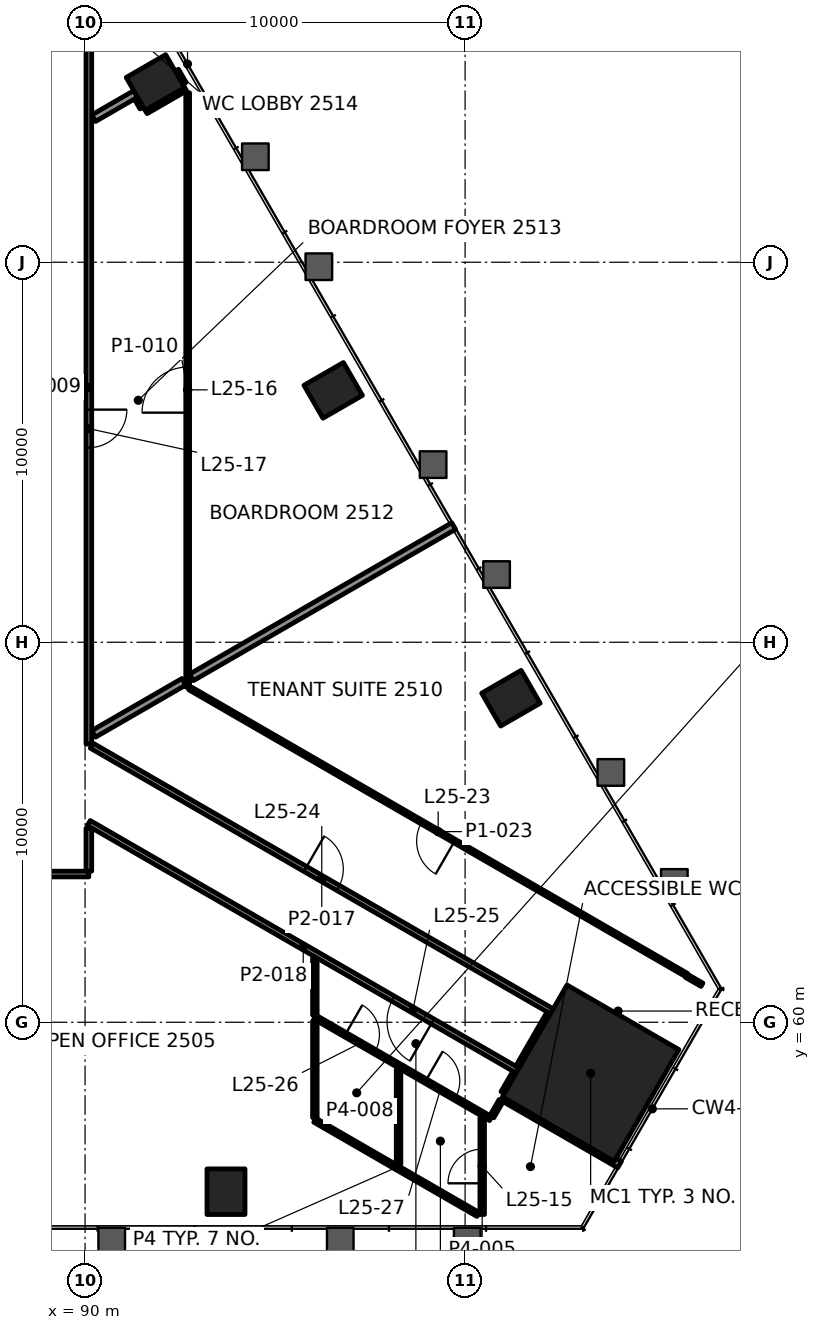
"""IFC4 building model, lengths in metres.
Left out: names, types, materials, properties, quantities, classifications, styles, units other than length and angle.
Written with IfcOpenShell. Run it as: python <this file> out.ifc"""

import sys

from ifc_helpers import new_model, si_unit, direction, frame, frame_2d, origin, origin_2d, place, context, subcontext, project, spatial, rectangle, extrude, element, fill, save


model = new_model("IFC4")
c1 = context("Model", 3, precision=1e-05, world=origin(), true_north=direction((0.0, 1.0)))
c2 = subcontext(c1, "Body", "Model", "MODEL_VIEW")
j1 = project(units=[si_unit("LENGTHUNIT", "METRE"), si_unit("PLANEANGLEUNIT", "RADIAN")], contexts=[c1])
p1 = place(None, origin())
s1 = spatial("IfcSite", under=j1, at=p1, CompositionType="ELEMENT")
p2 = place(p1, origin())
s2 = spatial("IfcBuilding", under=s1, at=p2, CompositionType="ELEMENT")
p3 = place(p2, frame((0.0, 0.0, 111.4)))
s3 = spatial("IfcBuildingStorey", under=s2, at=p3, CompositionType="ELEMENT", Elevation=111.4)
p4 = place(p3, frame((103.304, 58.659, 0.0), z_axis=(0.0, 0.0, 1.0), x_axis=(0.5, 0.866025403784, 0.0)))
e1 = element("IfcColumn", 1, at=p4, inside=s3, PredefinedType="COLUMN", context=c2, shape_type="SweptSolid", body=[
    extrude(rectangle(XDim=3.4, YDim=3.4, at=origin_2d()), origin(), (0.0, 0.0, 1.0), 4.2),
])
for number, where, z_axis, x_axis in (
    (2, (93.708, 55.541, -0.0), (0.0, 0.0, 1.0), (1.0, 0.0, 0.0)),
    (3, (101.206, 68.528, -0.0), (0.0, 0.0, 1.0), (-0.5, 0.866, 0.0)),
    (4, (96.529, 76.628, -0.0), (0.0, 0.0, 1.0), (-0.5, 0.866, 0.0)),
    (5, (91.852, 84.729, -0.0), (0.0, 0.0, 1.0), (-0.5, 0.866, 0.0)),
):
    element("IfcColumn", number, at=place(p3, frame(where, z_axis=z_axis, x_axis=x_axis)), inside=s3, PredefinedType="COLUMN", context=c2, shape_type="SweptSolid", body=[
        extrude(rectangle(XDim=1.0, YDim=1.2, at=origin_2d()), origin(), (0.0, 0.0, 1.0), 4.2),
    ])
p5 = place(p3, frame((90.099, 63.9, 0.0), z_axis=(0.0, 0.0, 1.0), x_axis=(-1.0, 0.0, 0.0)))
e6 = element("IfcWall", 6, at=p5, inside=s3, PredefinedType="PARTITIONING", context=c2, shape_type="SweptSolid", body=[
    extrude(rectangle(XDim=30.199, YDim=0.15, at=frame_2d((15.099, 0.0))), origin(), (0.0, 0.0, 1.0), 3.4),
])
p6 = place(p5, frame((5.882, 0.0, 0.0)))
e7 = element("IfcOpeningElement", 7, at=p6, cuts=e6, PredefinedType="OPENING", context=c2, shape_type="SweptSolid", body=[
    extrude(rectangle(XDim=1.2, YDim=2.1, at=frame_2d((0.6, 1.05))), frame((0.0, 0.085, 0.0), z_axis=(0.0, -1.0, 0.0), x_axis=(1.0, 0.0, 0.0)), (0.0, 0.0, 1.0), 0.17),
])
p7 = place(p5, frame((20.346, 0.0, 0.0)))
e8 = element("IfcOpeningElement", 8, at=p7, cuts=e6, PredefinedType="OPENING", context=c2, shape_type="SweptSolid", body=[
    extrude(rectangle(XDim=1.2, YDim=2.1, at=frame_2d((0.6, 1.05))), frame((0.0, 0.085, 0.0), z_axis=(0.0, -1.0, 0.0), x_axis=(1.0, 0.0, 0.0)), (0.0, 0.0, 1.0), 0.17),
])
p8 = place(p3, frame((90.227, 67.59, 0.0), z_axis=(0.0, 0.0, 1.0), x_axis=(0.866003105128, 0.500038620418, 0.0)))
e9 = element("IfcWall", 9, at=p8, inside=s3, PredefinedType="PARTITIONING", context=c2, shape_type="SweptSolid", body=[
    extrude(rectangle(XDim=2.74, YDim=0.2, at=frame_2d((1.37, 0.0))), origin(), (0.0, 0.0, 1.0), 3.4),
])
p9 = place(p3, frame((91.583, 83.997, 0.0), z_axis=(0.0, 0.0, 1.0), x_axis=(0.866066905393, 0.499928110214, 0.0)))
e10 = element("IfcWall", 10, at=p9, inside=s3, PredefinedType="PARTITIONING", context=c2, shape_type="SweptSolid", body=[
    extrude(rectangle(XDim=1.199, YDim=0.2, at=frame_2d((0.6, 0.0))), origin(), (0.0, 0.0, 1.0), 3.165),
])
p10 = place(p3, frame((90.227, 83.792, 0.0), z_axis=(0.0, 0.0, 1.0), x_axis=(0.866067665301, 0.499926793761, 0.0)))
e11 = element("IfcWall", 11, at=p10, inside=s3, PredefinedType="PARTITIONING", context=c2, shape_type="SweptSolid", body=[
    extrude(rectangle(XDim=1.276, YDim=0.2, at=frame_2d((0.638, 0.0))), origin(), (0.0, 0.0, 1.0), 3.4),
])
p11 = place(p3, frame((100.704, 57.516, 0.0), z_axis=(0.0, 0.0, 1.0), x_axis=(0.499679281737, 0.866210491395, 0.0)))
e12 = element("IfcWall", 12, at=p11, inside=s3, PredefinedType="PARTITIONING", context=c2, shape_type="SweptSolid", body=[
    extrude(rectangle(XDim=0.49, YDim=0.12, at=frame_2d((0.245, 0.0))), origin(), (0.0, 0.0, 1.0), 3.4),
])
p12 = place(p3, frame((101.031, 58.124, 0.0), z_axis=(0.0, 0.0, 1.0), x_axis=(0.500049599607, 0.865996765544, 0.0)))
e13 = element("IfcWall", 13, at=p12, inside=s3, PredefinedType="PARTITIONING", context=c2, shape_type="SweptSolid", body=[
    extrude(rectangle(XDim=0.625, YDim=0.2, at=frame_2d((0.312, 0.0))), origin(), (0.0, 0.0, 1.0), 3.4),
])
p13 = place(p3, frame((100.45, 54.941, 0.0), z_axis=(0.0, 0.0, 1.0), x_axis=(0.0, 1.0, 0.0)))
e14 = element("IfcWall", 14, at=p13, inside=s3, PredefinedType="PARTITIONING", context=c2, shape_type="SweptSolid", body=[
    extrude(rectangle(XDim=2.542, YDim=0.12, at=frame_2d((1.271, 0.0))), origin(), (0.0, 0.0, 1.0), 3.4),
])
p14 = place(p13, frame((0.821, 0.0, 0.0)))
e15 = element("IfcOpeningElement", 15, at=p14, cuts=e14, PredefinedType="OPENING", context=c2, shape_type="SweptSolid", body=[
    extrude(rectangle(XDim=0.9, YDim=2.1, at=frame_2d((0.45, 1.05))), frame((0.0, 0.07, 0.0), z_axis=(0.0, -1.0, 0.0), x_axis=(1.0, 0.0, 0.0)), (0.0, 0.0, 1.0), 0.14),
])
p15 = place(p3, frame((98.249, 56.26, 0.0), z_axis=(0.0, 0.0, 1.0), x_axis=(0.0, 1.0, 0.0)))
e16 = element("IfcWall", 16, at=p15, inside=s3, PredefinedType="PARTITIONING", context=c2, shape_type="SweptSolid", body=[
    extrude(rectangle(XDim=2.495, YDim=0.12, at=frame_2d((1.248, 0.0))), origin(), (0.0, 0.0, 1.0), 3.4),
])
p16 = place(p3, frame((96.047, 57.491, 0.0), z_axis=(0.0, 0.0, 1.0), x_axis=(0.0, 1.0, 0.0)))
e17 = element("IfcWall", 17, at=p16, inside=s3, PredefinedType="PARTITIONING", context=c2, shape_type="SweptSolid", body=[
    extrude(rectangle(XDim=2.541, YDim=0.12, at=frame_2d((1.27, 0.0))), origin(), (0.0, 0.0, 1.0), 3.4),
])
p17 = place(p3, frame((92.7, 68.823, 0.0), z_axis=(0.0, 0.0, 1.0), x_axis=(0.0, 1.0, 0.0)))
e18 = element("IfcWall", 18, at=p17, inside=s3, PredefinedType="PARTITIONING", context=c2, shape_type="SweptSolid", body=[
    extrude(rectangle(XDim=15.638, YDim=0.1, at=frame_2d((7.819, 0.0))), origin(), (0.0, 0.0, 1.0), 3.165),
])
p18 = place(p17, frame((7.219, 0.0, 0.0)))
e19 = element("IfcOpeningElement", 19, at=p18, cuts=e18, PredefinedType="OPENING", context=c2, shape_type="SweptSolid", body=[
    extrude(rectangle(XDim=1.2, YDim=2.1, at=frame_2d((0.6, 1.05))), frame((0.0, 0.06, 0.0), z_axis=(0.0, -1.0, 0.0), x_axis=(1.0, 0.0, 0.0)), (0.0, 0.0, 1.0), 0.12),
])
p19 = place(p3, frame((90.1, 63.976, 0.0), z_axis=(0.0, 0.0, 1.0), x_axis=(0.0, 1.0, 0.0)))
e20 = element("IfcWall", 20, at=p19, inside=s3, PredefinedType="PARTITIONING", context=c2, shape_type="SweptSolid", body=[
    extrude(rectangle(XDim=1.131, YDim=0.15, at=frame_2d((0.565, 0.0))), origin(), (0.0, 0.0, 1.0), 3.247),
])
p20 = place(p3, frame((90.1, 86.1, 0.0), z_axis=(0.0, 0.0, 1.0), x_axis=(0.0, -1.0, 0.0)))
e21 = element("IfcWall", 21, at=p20, inside=s3, PredefinedType="PARTITIONING", context=c2, shape_type="SweptSolid", body=[
    extrude(rectangle(XDim=18.778, YDim=0.15, at=frame_2d((9.389, 0.0))), origin(), (0.0, 0.0, 1.0), 3.4),
])
p21 = place(p20, frame((9.978, 0.0, 0.0)))
e22 = element("IfcOpeningElement", 22, at=p21, cuts=e21, PredefinedType="OPENING", context=c2, shape_type="SweptSolid", body=[
    extrude(rectangle(XDim=1.0, YDim=2.1, at=frame_2d((0.5, 1.05))), frame((0.0, 0.085, 0.0), z_axis=(0.0, -1.0, 0.0), x_axis=(1.0, 0.0, 0.0)), (0.0, 0.0, 1.0), 0.17),
])
p22 = place(p3, frame((92.572, 84.684, 0.0), z_axis=(0.0, 0.0, 1.0), x_axis=(-0.500216468111, 0.865900389786, 0.0)))
e23 = element("IfcWall", 23, at=p22, inside=s3, PredefinedType="PARTITIONING", context=c2, shape_type="SweptSolid", body=[
    extrude(rectangle(XDim=0.399, YDim=0.2, at=frame_2d((0.2, 0.0))), origin(), (0.0, 0.0, 1.0), 3.4),
])
p23 = place(p3, frame((91.532, 84.083, 0.0), z_axis=(0.0, 0.0, 1.0), x_axis=(-0.49965177357, 0.866226359082, 0.0)))
e24 = element("IfcWall", 24, at=p23, inside=s3, PredefinedType="PARTITIONING", context=c2, shape_type="SweptSolid", body=[
    extrude(rectangle(XDim=0.299, YDim=0.2, at=frame_2d((0.149, 0.0))), origin(), (0.0, 0.0, 1.0), 3.4),
])
p24 = place(p3, frame((105.833, 61.24, 0.0), z_axis=(0.0, 0.0, 1.0), x_axis=(-0.866025727262, 0.499999439721, 0.0)))
e25 = element("IfcWall", 25, at=p24, inside=s3, PredefinedType="PARTITIONING", context=c2, shape_type="SweptSolid", body=[
    extrude(rectangle(XDim=15.107, YDim=0.1, at=frame_2d((7.553, 0.0))), origin(), (0.0, 0.0, 1.0), 3.4),
])
p25 = place(p24, frame((7.053, 0.0, 0.0)))
e26 = element("IfcOpeningElement", 26, at=p25, cuts=e25, PredefinedType="OPENING", context=c2, shape_type="SweptSolid", body=[
    extrude(rectangle(XDim=1.0, YDim=2.1, at=frame_2d((0.5, 1.05))), frame((0.0, 0.06, 0.0), z_axis=(0.0, -1.0, 0.0), x_axis=(1.0, 0.0, 0.0)), (0.0, 0.0, 1.0), 0.12),
])
p26 = place(p3, frame((106.233, 60.986, 0.0), z_axis=(0.0, 0.0, 1.0), x_axis=(-0.866073792734, 0.499916178513, 0.0)))
e27 = element("IfcWall", 27, at=p26, inside=s3, PredefinedType="PARTITIONING", context=c2, shape_type="SweptSolid", body=[
    extrude(rectangle(XDim=0.473, YDim=0.1, at=frame_2d((0.236, 0.0))), origin(), (0.0, 0.0, 1.0), 3.4),
])
p27 = place(p3, frame((90.175, 67.278, 0.0), z_axis=(0.0, 0.0, 1.0), x_axis=(0.866025916507, -0.499999111938, 0.0)))
e28 = element("IfcWall", 28, at=p27, inside=s3, PredefinedType="PARTITIONING", context=c2, shape_type="SweptSolid", body=[
    extrude(rectangle(XDim=13.979, YDim=0.15, at=frame_2d((6.99, 0.0))), origin(), (0.0, 0.0, 1.0), 3.4),
])
p28 = place(p27, frame((6.49, 0.0, 0.0)))
e29 = element("IfcOpeningElement", 29, at=p28, cuts=e28, PredefinedType="OPENING", context=c2, shape_type="SweptSolid", body=[
    extrude(rectangle(XDim=1.0, YDim=2.1, at=frame_2d((0.5, 1.05))), frame((0.0, 0.085, 0.0), z_axis=(0.0, -1.0, 0.0), x_axis=(1.0, 0.0, 0.0)), (0.0, 0.0, 1.0), 0.17),
])
p29 = place(p3, frame((101.382, 58.729, 0.0), z_axis=(0.0, 0.0, 1.0), x_axis=(-0.866023606965, 0.500003112169, 0.0)))
e30 = element("IfcWall", 30, at=p29, inside=s3, PredefinedType="PARTITIONING", context=c2, shape_type="SweptSolid", body=[
    extrude(rectangle(XDim=13.027, YDim=0.15, at=frame_2d((6.513, 0.0))), origin(), (0.0, 0.0, 1.0), 3.247),
])
p30 = place(p29, frame((2.581, 0.0, 0.0)))
e31 = element("IfcOpeningElement", 31, at=p30, cuts=e30, PredefinedType="OPENING", context=c2, shape_type="SweptSolid", body=[
    extrude(rectangle(XDim=1.2, YDim=2.1, at=frame_2d((0.6, 1.05))), frame((0.0, 0.085, 0.0), z_axis=(0.0, -1.0, 0.0), x_axis=(1.0, 0.0, 0.0)), (0.0, 0.0, 1.0), 0.17),
])
p31 = place(p3, frame((104.065, 56.257, 0.0), z_axis=(0.0, 0.0, 1.0), x_axis=(-0.866034141321, 0.499984865837, 0.0)))
e32 = element("IfcWall", 32, at=p31, inside=s3, PredefinedType="PARTITIONING", context=c2, shape_type="SweptSolid", body=[
    extrude(rectangle(XDim=3.543, YDim=0.2, at=frame_2d((1.772, 0.0))), origin(), (0.0, 0.0, 1.0), 3.4),
])
p32 = place(p3, frame((96.047, 60.135, 0.0), z_axis=(0.0, 0.0, 1.0), x_axis=(0.866018138487, -0.500012583653, 0.0)))
e33 = element("IfcWall", 33, at=p32, inside=s3, PredefinedType="PARTITIONING", context=c2, shape_type="SweptSolid", body=[
    extrude(rectangle(XDim=5.342, YDim=0.12, at=frame_2d((2.671, 0.0))), origin(), (0.0, 0.0, 1.0), 3.4),
])
p33 = place(p32, frame((0.923, 0.0, 0.0)))
e34 = element("IfcOpeningElement", 34, at=p33, cuts=e33, PredefinedType="OPENING", context=c2, shape_type="SweptSolid", body=[
    extrude(rectangle(XDim=0.9, YDim=2.1, at=frame_2d((0.45, 1.05))), frame((0.0, 0.07, 0.0), z_axis=(0.0, -1.0, 0.0), x_axis=(1.0, 0.0, 0.0)), (0.0, 0.0, 1.0), 0.14),
])
p34 = place(p32, frame((3.364, 0.0, 0.0)))
e35 = element("IfcOpeningElement", 35, at=p34, cuts=e33, PredefinedType="OPENING", context=c2, shape_type="SweptSolid", body=[
    extrude(rectangle(XDim=0.9, YDim=2.1, at=frame_2d((0.45, 1.05))), frame((0.0, 0.07, 0.0), z_axis=(0.0, -1.0, 0.0), x_axis=(1.0, 0.0, 0.0)), (0.0, 0.0, 1.0), 0.14),
])
p35 = place(p3, frame((100.343, 54.941, 0.0), z_axis=(0.0, 0.0, 1.0), x_axis=(-0.866005271205, 0.500034869029, 0.0)))
e36 = element("IfcWall", 36, at=p35, inside=s3, PredefinedType="PARTITIONING", context=c2, shape_type="SweptSolid", body=[
    extrude(rectangle(XDim=4.961, YDim=0.12, at=frame_2d((2.48, 0.0))), origin(), (0.0, 0.0, 1.0), 3.4),
])
p36 = place(p3, frame((92.8, 69.075, 0.0), z_axis=(0.0, 0.0, 1.0), x_axis=(0.866027879581, 0.49999571177, 0.0)))
e37 = element("IfcWall", 37, at=p36, inside=s3, PredefinedType="PARTITIONING", context=c2, shape_type="SweptSolid", body=[
    extrude(rectangle(XDim=7.966, YDim=0.2, at=frame_2d((3.983, 0.0))), origin(), (0.0, 0.0, 1.0), 3.165),
])
p37 = place(p3, frame((101.419, 58.795, 0.0), z_axis=(0.0, 0.0, 1.0), x_axis=(0.499944585209, 0.866057395165, 0.0)))
e38 = element("IfcWall", 38, at=p37, inside=s3, PredefinedType="PARTITIONING", context=c2, shape_type="SweptSolid", body=[
    extrude(rectangle(XDim=1.649, YDim=0.2, at=frame_2d((0.825, 0.0))), origin(), (0.0, 0.0, 1.0), 3.247),
])
p38 = place(p3, frame((96.047, 60.187, 0.0), z_axis=(0.0, 0.0, 1.0), x_axis=(0.0, 1.0, 0.0)))
e39 = element("IfcWall", 39, at=p38, inside=s3, PredefinedType="PARTITIONING", context=c2, shape_type="SweptSolid", body=[
    extrude(rectangle(XDim=1.496, YDim=0.12, at=frame_2d((0.748, 0.0))), origin(), (0.0, 0.0, 1.0), 3.4),
])
p39 = place(p14, origin())
e40 = element("IfcDoor", 40, at=p39, inside=s3, OperationType="SINGLE_SWING_RIGHT", PredefinedType="DOOR", context=c2, shape_type="SweptSolid", body=[
    extrude(rectangle(XDim=0.9, YDim=2.1, at=frame_2d((0.45, 1.05))), frame((0.0, 0.025, 0.0), z_axis=(0.0, -1.0, 0.0), x_axis=(1.0, 0.0, 0.0)), (0.0, 0.0, 1.0), 0.05),
])
fill(e15, e40)
p40 = place(p18, origin())
e41 = element("IfcDoor", 41, at=p40, inside=s3, OperationType="DOUBLE_DOOR_SINGLE_SWING", PredefinedType="DOOR", context=c2, shape_type="SweptSolid", body=[
    extrude(rectangle(XDim=1.2, YDim=2.1, at=frame_2d((0.6, 1.05))), frame((0.0, 0.025, 0.0), z_axis=(0.0, -1.0, 0.0), x_axis=(1.0, 0.0, 0.0)), (0.0, 0.0, 1.0), 0.05),
])
fill(e19, e41)
p41 = place(p21, origin())
e42 = element("IfcDoor", 42, at=p41, inside=s3, OperationType="SINGLE_SWING_LEFT", PredefinedType="DOOR", context=c2, shape_type="SweptSolid", body=[
    extrude(rectangle(XDim=1.0, YDim=2.1, at=frame_2d((0.5, 1.05))), frame((0.0, 0.025, 0.0), z_axis=(0.0, -1.0, 0.0), x_axis=(1.0, 0.0, 0.0)), (0.0, 0.0, 1.0), 0.05),
])
fill(e22, e42)
p42 = place(p25, origin())
e43 = element("IfcDoor", 43, at=p42, inside=s3, OperationType="SINGLE_SWING_LEFT", PredefinedType="DOOR", context=c2, shape_type="SweptSolid", body=[
    extrude(rectangle(XDim=1.0, YDim=2.1, at=frame_2d((0.5, 1.05))), frame((0.0, 0.025, 0.0), z_axis=(0.0, -1.0, 0.0), x_axis=(1.0, 0.0, 0.0)), (0.0, 0.0, 1.0), 0.05),
])
fill(e26, e43)
p43 = place(p28, origin())
e44 = element("IfcDoor", 44, at=p43, inside=s3, OperationType="SINGLE_SWING_LEFT", PredefinedType="DOOR", context=c2, shape_type="SweptSolid", body=[
    extrude(rectangle(XDim=1.0, YDim=2.1, at=frame_2d((0.5, 1.05))), frame((0.0, 0.025, 0.0), z_axis=(0.0, -1.0, 0.0), x_axis=(1.0, 0.0, 0.0)), (0.0, 0.0, 1.0), 0.05),
])
fill(e29, e44)
p44 = place(p30, origin())
e45 = element("IfcDoor", 45, at=p44, inside=s3, OperationType="DOUBLE_DOOR_SINGLE_SWING", PredefinedType="DOOR", context=c2, shape_type="SweptSolid", body=[
    extrude(rectangle(XDim=1.2, YDim=2.1, at=frame_2d((0.6, 1.05))), frame((0.0, 0.025, 0.0), z_axis=(0.0, -1.0, 0.0), x_axis=(1.0, 0.0, 0.0)), (0.0, 0.0, 1.0), 0.05),
])
fill(e31, e45)
p45 = place(p33, origin())
e46 = element("IfcDoor", 46, at=p45, inside=s3, OperationType="SINGLE_SWING_LEFT", PredefinedType="DOOR", context=c2, shape_type="SweptSolid", body=[
    extrude(rectangle(XDim=0.9, YDim=2.1, at=frame_2d((0.45, 1.05))), frame((0.0, 0.025, 0.0), z_axis=(0.0, -1.0, 0.0), x_axis=(1.0, 0.0, 0.0)), (0.0, 0.0, 1.0), 0.05),
])
fill(e34, e46)
p46 = place(p34, origin())
e47 = element("IfcDoor", 47, at=p46, inside=s3, OperationType="SINGLE_SWING_RIGHT", PredefinedType="DOOR", context=c2, shape_type="SweptSolid", body=[
    extrude(rectangle(XDim=0.9, YDim=2.1, at=frame_2d((0.45, 1.05))), frame((0.0, 0.025, 0.0), z_axis=(0.0, -1.0, 0.0), x_axis=(1.0, 0.0, 0.0)), (0.0, 0.0, 1.0), 0.05),
])
fill(e35, e47)
save(model, sys.argv[1])
